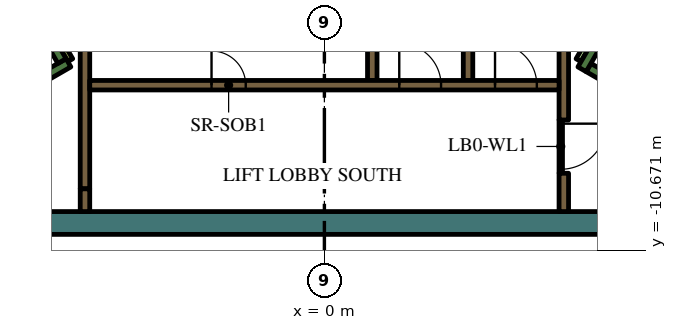
"""IFC4 building model, lengths in metres.
Left out: names, types, materials, properties, quantities, classifications, styles, units other than length and angle.
Written with IfcOpenShell. Run it as: python <this file> out.ifc"""

import sys

from ifc_helpers import new_model, si_unit, direction, frame, frame_2d, origin, place, context, subcontext, project, spatial, polyline, rectangle, outline, extrude, element, fill, save


model = new_model("IFC4")
c1 = context("Model", 3, precision=1e-05, world=origin(), true_north=direction((0.0, 1.0)))
c2 = subcontext(c1, "Body", "Model", "MODEL_VIEW")
j1 = project(units=[si_unit("LENGTHUNIT", "METRE"), si_unit("PLANEANGLEUNIT", "RADIAN")], contexts=[c1])
p1 = place(None, origin())
s1 = spatial("IfcSite", under=j1, at=p1, CompositionType="ELEMENT")
p2 = place(p1, origin())
s2 = spatial("IfcBuilding", under=s1, at=p2, CompositionType="ELEMENT")
p3 = place(p2, frame((0.0, 0.0, 292.2)))
s3 = spatial("IfcBuildingStorey", under=s2, at=p3, CompositionType="ELEMENT", Elevation=292.2)
p4 = place(p3, origin())
e1 = element("IfcWall", 1, at=p4, inside=s3, PredefinedType="SOLIDWALL", context=c2, shape_type="SweptSolid", body=[
    extrude(outline(polyline([(-15.502, -6.35), (-4.912, 11.992), (-4.393, 11.692), (-10.815, 0.569), (-10.84, 0.583), (-10.84, 0.583), (-10.84, 0.583), (-10.965, 0.367), (-10.965, 0.367), (-10.965, 0.367), (-10.94, 0.352), (-11.033, 0.191), (-14.809, -6.35), (-15.156, -6.95), (-15.502, -6.35)])), origin(), (0.0, 0.0, 1.0), 4.2),
])
p5 = place(p3, frame((-10.556, -9.95, 0.0), z_axis=(0.0, 0.0, 1.0), x_axis=(1.0, 0.0, 0.0)))
e2 = element("IfcWall", 2, at=p5, inside=s3, PredefinedType="SOLIDWALL", context=c2, shape_type="SweptSolid", body=[
    extrude(rectangle(XDim=19.461, YDim=0.6, at=frame_2d((9.73, 0.0))), origin(), (0.0, 0.0, 1.0), 4.2),
])
p6 = place(p3, frame((12.84, -9.261, 0.0), z_axis=(0.0, 0.0, 1.0), x_axis=(-0.866013990052, 0.500019768644, 0.0)))
e3 = element("IfcWall", 3, at=p6, inside=s3, PredefinedType="SOLIDWALL", context=c2, shape_type="SweptSolid", body=[
    extrude(rectangle(XDim=6.8, YDim=0.25, at=frame_2d((3.4, 0.0))), origin(), (0.0, 0.0, 1.0), 4.2),
])
p7 = place(p3, frame((7.113, -5.33, 0.0), z_axis=(0.0, 0.0, 1.0), x_axis=(-0.499965889992, -0.866045096311, 0.0)))
e4 = element("IfcWall", 4, at=p7, inside=s3, PredefinedType="SOLIDWALL", context=c2, shape_type="SweptSolid", body=[
    extrude(rectangle(XDim=0.666, YDim=0.25, at=frame_2d((0.333, 0.0))), origin(), (0.0, 0.0, 1.0), 4.2),
])
p8 = place(p3, frame((-12.84, -9.261, 0.0), z_axis=(0.0, 0.0, 1.0), x_axis=(0.866016039709, 0.500016218704, 0.0)))
e5 = element("IfcWall", 5, at=p8, inside=s3, PredefinedType="SOLIDWALL", context=c2, shape_type="SweptSolid", body=[
    extrude(rectangle(XDim=7.05, YDim=0.25, at=frame_2d((3.525, 0.0))), origin(), (0.0, 0.0, 1.0), 4.2),
])
p9 = place(p3, frame((-6.905, -5.69, 0.0), z_axis=(0.0, 0.0, 1.0), x_axis=(-0.499993700073, 0.866029041019, 0.0)))
e6 = element("IfcWall", 6, at=p9, inside=s3, PredefinedType="SOLIDWALL", context=c2, shape_type="SweptSolid", body=[
    extrude(rectangle(XDim=0.416, YDim=0.25, at=frame_2d((0.208, 0.0))), origin(), (0.0, 0.0, 1.0), 4.2),
])
p10 = place(p3, frame((6.3, -7.24, 0.0), z_axis=(0.0, 0.0, 1.0), x_axis=(0.0, 1.0, 0.0)))
e7 = element("IfcWall", 7, at=p10, inside=s3, PredefinedType="SOLIDWALL", context=c2, shape_type="SweptSolid", body=[
    extrude(rectangle(XDim=3.24, YDim=0.25, at=frame_2d((1.62, 0.0))), origin(), (0.0, 0.0, 1.0), 4.2),
])
p11 = place(p3, frame((6.3, -9.65, 0.0), z_axis=(0.0, 0.0, 1.0), x_axis=(0.0, 1.0, 0.0)))
e8 = element("IfcWall", 8, at=p11, inside=s3, PredefinedType="SOLIDWALL", context=c2, shape_type="SweptSolid", body=[
    extrude(rectangle(XDim=1.008, YDim=0.25, at=frame_2d((0.504, 0.0))), origin(), (0.0, 0.0, 1.0), 4.2),
])
for number, where, z_axis, x_axis in (
    (9, (3.78, -4.0, 0.0), (0.0, 0.0, 1.0), (0.0, -1.0, 0.0)),
    (10, (1.26, -4.0, 0.0), (0.0, 0.0, 1.0), (0.0, -1.0, 0.0)),
):
    element("IfcWall", number, at=place(p3, frame(where, z_axis=z_axis, x_axis=x_axis)), inside=s3, PredefinedType="SOLIDWALL", context=c2, shape_type="SweptSolid", body=[
        extrude(rectangle(XDim=2.2, YDim=0.25, at=frame_2d((1.1, 0.0))), origin(), (0.0, 0.0, 1.0), 4.2),
    ])
p12 = place(p3, frame((-6.3, -9.05, 0.0), z_axis=(0.0, 0.0, 1.0), x_axis=(0.0, 1.0, 0.0)))
e11 = element("IfcWall", 11, at=p12, inside=s3, PredefinedType="SOLIDWALL", context=c2, shape_type="SweptSolid", body=[
    extrude(rectangle(XDim=5.23, YDim=0.25, at=frame_2d((2.615, 0.0))), origin(), (0.0, 0.0, 1.0), 4.2),
])
p13 = place(p3, frame((-6.3, -9.052, 0.0), z_axis=(0.0, 0.0, 1.0), x_axis=(0.0, -1.0, 0.0)))
e12 = element("IfcWall", 12, at=p13, inside=s3, PredefinedType="SOLIDWALL", context=c2, shape_type="SweptSolid", body=[
    extrude(rectangle(XDim=0.598, YDim=0.25, at=frame_2d((0.299, 0.0))), origin(), (0.0, 0.0, 1.0), 4.2),
])
p14 = place(p3, frame((-6.94, -5.23, 0.0), z_axis=(0.0, 0.0, 1.0), x_axis=(0.499834152157, -0.86612113491, 0.0)))
e13 = element("IfcWall", 13, at=p14, inside=s3, PredefinedType="PARTITIONING", context=c2, shape_type="SweptSolid", body=[
    extrude(rectangle(XDim=0.505, YDim=0.15, at=frame_2d((0.252, 0.0))), origin(), (0.0, 0.0, 1.0), 4.2),
])
p15 = place(p3, frame((6.688, -5.667, 0.0), z_axis=(0.0, 0.0, 1.0), x_axis=(0.499834152157, 0.86612113491, 0.0)))
e14 = element("IfcWall", 14, at=p15, inside=s3, PredefinedType="PARTITIONING", context=c2, shape_type="SweptSolid", body=[
    extrude(rectangle(XDim=0.505, YDim=0.15, at=frame_2d((0.252, 0.0))), origin(), (0.0, 0.0, 1.0), 3.55),
])
p16 = place(p3, frame((-6.175, -6.325, 0.0), z_axis=(0.0, 0.0, 1.0), x_axis=(1.0, 0.0, 0.0)))
e15 = element("IfcWall", 15, at=p16, inside=s3, PredefinedType="SOLIDWALL", context=c2, shape_type="SweptSolid", body=[
    extrude(rectangle(XDim=12.35, YDim=0.25, at=frame_2d((6.175, 0.0))), origin(), (0.0, 0.0, 1.0), 4.2),
])
p17 = place(p16, frame((3.205, 0.0, 0.0)))
e16 = element("IfcOpeningElement", 16, at=p17, cuts=e15, PredefinedType="OPENING", context=c2, shape_type="SweptSolid", body=[
    extrude(rectangle(XDim=0.9, YDim=2.1, at=frame_2d((0.45, 1.05))), frame((0.0, 0.135, 0.0), z_axis=(0.0, -1.0, 0.0), x_axis=(1.0, 0.0, 0.0)), (0.0, 0.0, 1.0), 0.27),
])
p18 = place(p16, frame((8.145, 0.0, 0.0)))
e17 = element("IfcOpeningElement", 17, at=p18, cuts=e15, PredefinedType="OPENING", context=c2, shape_type="SweptSolid", body=[
    extrude(rectangle(XDim=1.1, YDim=2.1, at=frame_2d((0.55, 1.05))), frame((0.0, 0.135, 0.0), z_axis=(0.0, -1.0, 0.0), x_axis=(1.0, 0.0, 0.0)), (0.0, 0.0, 1.0), 0.27),
])
p19 = place(p16, frame((10.665, 0.0, 0.0)))
e18 = element("IfcOpeningElement", 18, at=p19, cuts=e15, PredefinedType="OPENING", context=c2, shape_type="SweptSolid", body=[
    extrude(rectangle(XDim=1.1, YDim=2.1, at=frame_2d((0.55, 1.05))), frame((0.0, 0.135, 0.0), z_axis=(0.0, -1.0, 0.0), x_axis=(1.0, 0.0, 0.0)), (0.0, 0.0, 1.0), 0.27),
])
p20 = place(p3, frame((6.22, -7.237, 0.0), z_axis=(0.0, 0.0, 1.0), x_axis=(0.0, -1.0, 0.0)))
e19 = element("IfcWall", 19, at=p20, inside=s3, PredefinedType="PARTITIONING", context=c2, shape_type="SweptSolid", body=[
    extrude(rectangle(XDim=1.4, YDim=0.09, at=frame_2d((0.7, 0.0))), origin(), (0.0, 0.0, 1.0), 3.55),
])
p21 = place(p20, frame((0.1, 0.0, 0.0)))
e20 = element("IfcOpeningElement", 20, at=p21, cuts=e19, PredefinedType="OPENING", context=c2, shape_type="SweptSolid", body=[
    extrude(rectangle(XDim=1.2, YDim=2.1, at=frame_2d((0.6, 1.05))), frame((0.0, 0.055, 0.0), z_axis=(0.0, -1.0, 0.0), x_axis=(1.0, 0.0, 0.0)), (0.0, 0.0, 1.0), 0.11),
])
p22 = place(p17, origin())
e21 = element("IfcDoor", 21, at=p22, inside=s3, OperationType="SINGLE_SWING_LEFT", PredefinedType="DOOR", context=c2, shape_type="SweptSolid", body=[
    extrude(rectangle(XDim=0.9, YDim=2.1, at=frame_2d((0.45, 1.05))), frame((0.0, 0.025, 0.0), z_axis=(0.0, -1.0, 0.0), x_axis=(1.0, 0.0, 0.0)), (0.0, 0.0, 1.0), 0.05),
])
fill(e16, e21)
p23 = place(p18, origin())
e22 = element("IfcDoor", 22, at=p23, inside=s3, OperationType="DOUBLE_DOOR_SLIDING", PredefinedType="DOOR", context=c2, shape_type="SweptSolid", body=[
    extrude(rectangle(XDim=1.1, YDim=2.1, at=frame_2d((0.55, 1.05))), frame((0.0, 0.025, 0.0), z_axis=(0.0, -1.0, 0.0), x_axis=(1.0, 0.0, 0.0)), (0.0, 0.0, 1.0), 0.05),
])
fill(e17, e22)
p24 = place(p19, origin())
e23 = element("IfcDoor", 23, at=p24, inside=s3, OperationType="DOUBLE_DOOR_SLIDING", PredefinedType="DOOR", context=c2, shape_type="SweptSolid", body=[
    extrude(rectangle(XDim=1.1, YDim=2.1, at=frame_2d((0.55, 1.05))), frame((0.0, 0.025, 0.0), z_axis=(0.0, -1.0, 0.0), x_axis=(1.0, 0.0, 0.0)), (0.0, 0.0, 1.0), 0.05),
])
fill(e18, e23)
p25 = place(p21, origin())
e24 = element("IfcDoor", 24, at=p25, inside=s3, OperationType="SINGLE_SWING_LEFT", PredefinedType="DOOR", context=c2, shape_type="SweptSolid", body=[
    extrude(rectangle(XDim=1.2, YDim=2.1, at=frame_2d((0.6, 1.05))), frame((0.0, 0.025, 0.0), z_axis=(0.0, -1.0, 0.0), x_axis=(1.0, 0.0, 0.0)), (0.0, 0.0, 1.0), 0.05),
])
fill(e20, e24)
save(model, sys.argv[1])
